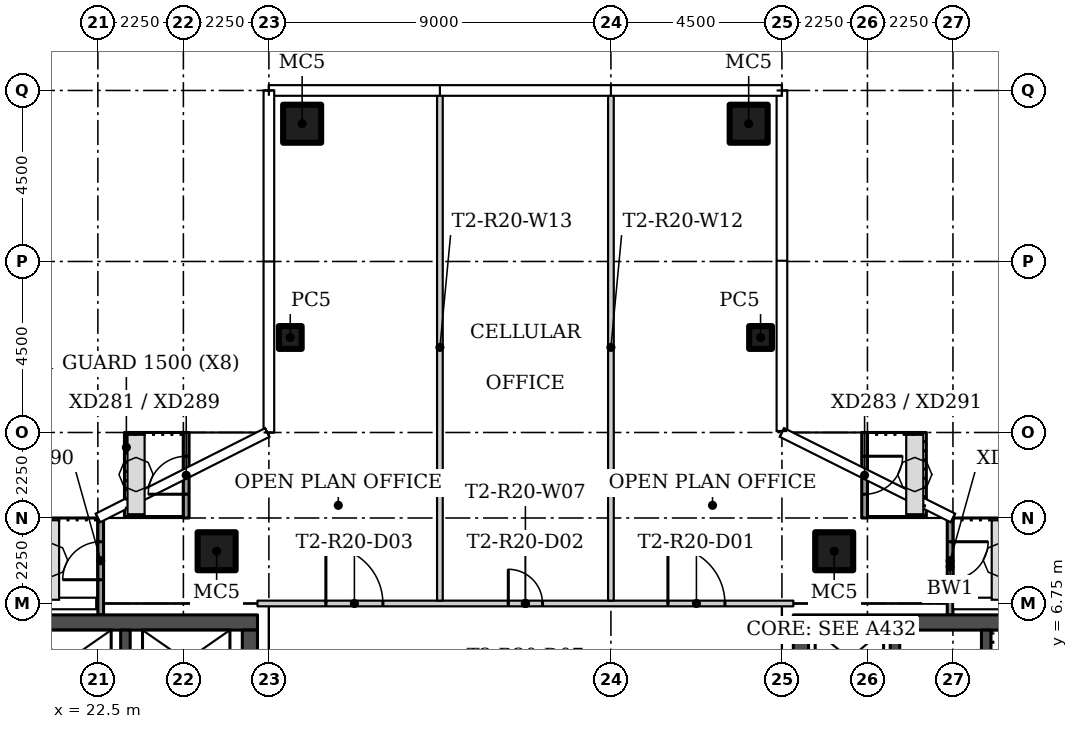
"""IFC4 building model, lengths in metres.
Left out: names, types, materials, properties, quantities, classifications, styles, units other than length and angle.
Written with IfcOpenShell. Run it as: python <this file> out.ifc"""

import sys

from ifc_helpers import new_model, si_unit, direction, frame, frame_2d, origin, origin_2d, place, context, subcontext, project, spatial, rectangle, hollow_rectangle, extrude, element, fill, save


model = new_model("IFC4")
c1 = context("Model", 3, precision=1e-05, world=origin(), true_north=direction((0.0, 1.0)))
c2 = subcontext(c1, "Body", "Model", "MODEL_VIEW")
j1 = project(units=[si_unit("LENGTHUNIT", "METRE"), si_unit("PLANEANGLEUNIT", "RADIAN")], contexts=[c1])
p1 = place(None, origin())
s1 = spatial("IfcSite", under=j1, at=p1, CompositionType="ELEMENT")
p2 = place(p1, origin())
s2 = spatial("IfcBuilding", under=s1, at=p2, CompositionType="ELEMENT")
p3 = place(p2, frame((0.0, 0.0, 186.6)))
s3 = spatial("IfcBuildingStorey", under=s2, at=p3, CompositionType="ELEMENT", Elevation=186.6)
for number, where in (
    (1, (25.625, 8.125, 0.0)),
    (2, (41.875, 8.125, 0.0)),
):
    element("IfcColumn", number, at=place(p3, frame(where)), inside=s3, PredefinedType="COLUMN", context=c2, shape_type="SweptSolid", body=[
        extrude(hollow_rectangle(XDim=1.0, YDim=1.0, WallThickness=0.04, at=origin_2d()), origin(), (0.0, 0.0, 1.0), 3.55),
    ])
p4 = place(p3, frame((39.938, 13.75, 0.0)))
e3 = element("IfcColumn", 3, at=p4, inside=s3, PredefinedType="COLUMN", context=c2, shape_type="SweptSolid", body=[
    extrude(hollow_rectangle(XDim=0.6, YDim=0.6, WallThickness=0.02, at=origin_2d()), origin(), (0.0, 0.0, 1.0), 3.55),
])
p5 = place(p3, frame((39.625, 19.375, 0.0)))
e4 = element("IfcColumn", 4, at=p5, inside=s3, PredefinedType="COLUMN", context=c2, shape_type="SweptSolid", body=[
    extrude(hollow_rectangle(XDim=1.0, YDim=1.0, WallThickness=0.04, at=origin_2d()), origin(), (0.0, 0.0, 1.0), 3.55),
])
p6 = place(p3, frame((27.562, 13.75, 0.0)))
e5 = element("IfcColumn", 5, at=p6, inside=s3, PredefinedType="COLUMN", context=c2, shape_type="SweptSolid", body=[
    extrude(hollow_rectangle(XDim=0.6, YDim=0.6, WallThickness=0.02, at=origin_2d()), origin(), (0.0, 0.0, 1.0), 3.55),
])
p7 = place(p3, frame((27.875, 19.375, 0.0)))
e6 = element("IfcColumn", 6, at=p7, inside=s3, PredefinedType="COLUMN", context=c2, shape_type="SweptSolid", body=[
    extrude(hollow_rectangle(XDim=1.0, YDim=1.0, WallThickness=0.04, at=origin_2d()), origin(), (0.0, 0.0, 1.0), 3.55),
])
p8 = place(p3, frame((26.7, 6.75, 0.0)))
e7 = element("IfcWall", 7, at=p8, inside=s3, PredefinedType="PARTITIONING", context=c2, shape_type="SweptSolid", body=[
    extrude(rectangle(XDim=14.1, YDim=0.15, at=frame_2d((7.05, 0.0))), origin(), (0.0, 0.0, 1.0), 3.55),
])
p9 = place(p8, frame((10.8, 0.0, 0.0)))
e8 = element("IfcOpeningElement", 8, at=p9, cuts=e7, PredefinedType="OPENING", context=c2, shape_type="SweptSolid", body=[
    extrude(rectangle(XDim=1.5, YDim=2.1, at=frame_2d((0.75, 1.05))), frame((0.0, 0.085, 0.0), z_axis=(0.0, -1.0, 0.0), x_axis=(1.0, 0.0, 0.0)), (0.0, 0.0, 1.0), 0.17),
])
p10 = place(p8, frame((6.6, 0.0, 0.0)))
e9 = element("IfcOpeningElement", 9, at=p10, cuts=e7, PredefinedType="OPENING", context=c2, shape_type="SweptSolid", body=[
    extrude(rectangle(XDim=0.9, YDim=2.1, at=frame_2d((0.45, 1.05))), frame((0.0, 0.085, 0.0), z_axis=(0.0, -1.0, 0.0), x_axis=(1.0, 0.0, 0.0)), (0.0, 0.0, 1.0), 0.17),
])
p11 = place(p8, frame((1.8, 0.0, 0.0)))
e10 = element("IfcOpeningElement", 10, at=p11, cuts=e7, PredefinedType="OPENING", context=c2, shape_type="SweptSolid", body=[
    extrude(rectangle(XDim=1.5, YDim=2.1, at=frame_2d((0.75, 1.05))), frame((0.0, 0.085, 0.0), z_axis=(0.0, -1.0, 0.0), x_axis=(1.0, 0.0, 0.0)), (0.0, 0.0, 1.0), 0.17),
])
for number, where, z_axis, x_axis in (
    (11, (36.0, 20.155, 0.0), (0.0, 0.0, 1.0), (0.0, -1.0, 0.0)),
    (12, (31.5, 20.155, 0.0), (0.0, 0.0, 1.0), (0.0, -1.0, 0.0)),
):
    element("IfcWall", number, at=place(p3, frame(where, z_axis=z_axis, x_axis=x_axis)), inside=s3, PredefinedType="PARTITIONING", context=c2, shape_type="SweptSolid", body=[
        extrude(rectangle(XDim=13.33, YDim=0.15, at=frame_2d((6.665, 0.0))), origin(), (0.0, 0.0, 1.0), 3.55),
    ])
p12 = place(p3, frame((24.825, 9.0, 0.0), z_axis=(0.0, 0.0, 1.0), x_axis=(0.0, 1.0, 0.0)))
e13 = element("IfcWall", 13, at=p12, inside=s3, PredefinedType="SOLIDWALL", context=c2, shape_type="SweptSolid", body=[
    extrude(rectangle(XDim=2.25, YDim=0.15, at=frame_2d((1.125, 0.0))), origin(), (0.0, 0.0, 1.0), 3.45),
])
p13 = place(p12, frame((0.625, 0.0, 0.0)))
e14 = element("IfcOpeningElement", 14, at=p13, cuts=e13, PredefinedType="OPENING", context=c2, shape_type="SweptSolid", body=[
    extrude(rectangle(XDim=1.0, YDim=2.4, at=frame_2d((0.5, 1.2))), frame((0.0, 0.085, 0.0), z_axis=(0.0, -1.0, 0.0), x_axis=(1.0, 0.0, 0.0)), (0.0, 0.0, 1.0), 0.17),
])
p14 = place(p3, frame((22.575, 6.448, 0.0), z_axis=(0.0, 0.0, 1.0), x_axis=(0.0, 1.0, 0.0)))
e15 = element("IfcWall", 15, at=p14, inside=s3, PredefinedType="SOLIDWALL", context=c2, shape_type="SweptSolid", body=[
    extrude(rectangle(XDim=2.552, YDim=0.15, at=frame_2d((1.276, 0.0))), origin(), (0.0, 0.0, 1.0), 3.45),
])
p15 = place(p14, frame((0.927, 0.0, 0.0)))
e16 = element("IfcOpeningElement", 16, at=p15, cuts=e15, PredefinedType="OPENING", context=c2, shape_type="SweptSolid", body=[
    extrude(rectangle(XDim=1.0, YDim=2.4, at=frame_2d((0.5, 1.2))), frame((0.0, 0.085, 0.0), z_axis=(0.0, -1.0, 0.0), x_axis=(1.0, 0.0, 0.0)), (0.0, 0.0, 1.0), 0.17),
])
p16 = place(p3, frame((42.675, 11.25, 0.0), z_axis=(0.0, 0.0, 1.0), x_axis=(0.0, -1.0, 0.0)))
e17 = element("IfcWall", 17, at=p16, inside=s3, PredefinedType="SOLIDWALL", context=c2, shape_type="SweptSolid", body=[
    extrude(rectangle(XDim=2.25, YDim=0.15, at=frame_2d((1.125, 0.0))), origin(), (0.0, 0.0, 1.0), 3.45),
])
p17 = place(p16, frame((0.625, 0.0, 0.0)))
e18 = element("IfcOpeningElement", 18, at=p17, cuts=e17, PredefinedType="OPENING", context=c2, shape_type="SweptSolid", body=[
    extrude(rectangle(XDim=1.0, YDim=2.4, at=frame_2d((0.5, 1.2))), frame((0.0, 0.085, 0.0), z_axis=(0.0, -1.0, 0.0), x_axis=(1.0, 0.0, 0.0)), (0.0, 0.0, 1.0), 0.17),
])
p18 = place(p3, frame((44.925, 9.0, 0.0), z_axis=(0.0, 0.0, 1.0), x_axis=(0.0, -1.0, 0.0)))
e19 = element("IfcWall", 19, at=p18, inside=s3, PredefinedType="SOLIDWALL", context=c2, shape_type="SweptSolid", body=[
    extrude(rectangle(XDim=2.557, YDim=0.15, at=frame_2d((1.278, 0.0))), origin(), (0.0, 0.0, 1.0), 3.45),
])
p19 = place(p18, frame((0.625, 0.0, 0.0)))
e20 = element("IfcOpeningElement", 20, at=p19, cuts=e19, PredefinedType="OPENING", context=c2, shape_type="SweptSolid", body=[
    extrude(rectangle(XDim=1.0, YDim=2.4, at=frame_2d((0.5, 1.2))), frame((0.0, 0.085, 0.0), z_axis=(0.0, -1.0, 0.0), x_axis=(1.0, 0.0, 0.0)), (0.0, 0.0, 1.0), 0.17),
])
p20 = place(p3, frame((13.8, 6.25, 0.0)))
e21 = element("IfcWall", 21, at=p20, inside=s3, PredefinedType="SHEAR", context=c2, shape_type="SweptSolid", body=[
    extrude(rectangle(XDim=12.9, YDim=0.4, at=frame_2d((6.45, 0.0))), origin(), (0.0, 0.0, 1.0), 3.55),
])
p21 = place(p3, frame((26.5, 6.05, 0.0), z_axis=(0.0, 0.0, 1.0), x_axis=(0.0, -1.0, 0.0)))
e22 = element("IfcWall", 22, at=p21, inside=s3, PredefinedType="SHEAR", context=c2, shape_type="SweptSolid", body=[
    extrude(rectangle(XDim=12.1, YDim=0.4, at=frame_2d((6.05, 0.0))), origin(), (0.0, 0.0, 1.0), 3.55),
])
p22 = place(p21, frame((10.1, 0.0, 0.0)))
e23 = element("IfcOpeningElement", 23, at=p22, cuts=e22, PredefinedType="OPENING", context=c2, shape_type="SweptSolid", body=[
    extrude(rectangle(XDim=1.2, YDim=2.1, at=frame_2d((0.6, 1.05))), frame((0.0, 0.21, 0.0), z_axis=(0.0, -1.0, 0.0), x_axis=(1.0, 0.0, 0.0)), (0.0, 0.0, 1.0), 0.42),
])
p23 = place(p21, frame((3.9, 0.0, 0.0)))
e24 = element("IfcOpeningElement", 24, at=p23, cuts=e22, PredefinedType="OPENING", context=c2, shape_type="SweptSolid", body=[
    extrude(rectangle(XDim=1.8, YDim=2.4, at=frame_2d((0.9, 1.2))), frame((0.0, 0.21, 0.0), z_axis=(0.0, -1.0, 0.0), x_axis=(1.0, 0.0, 0.0)), (0.0, 0.0, 1.0), 0.42),
])
p24 = place(p3, frame((23.225, 3.25, 0.0), z_axis=(0.0, 0.0, 1.0), x_axis=(0.0, 1.0, 0.0)))
e25 = element("IfcWall", 25, at=p24, inside=s3, PredefinedType="SHEAR", context=c2, shape_type="SweptSolid", body=[
    extrude(rectangle(XDim=2.8, YDim=0.25, at=frame_2d((1.4, 0.0))), origin(), (0.0, 0.0, 1.0), 3.55),
])
p25 = place(p3, frame((53.7, 6.25, 0.0), z_axis=(0.0, 0.0, 1.0), x_axis=(-1.0, 0.0, 0.0)))
e26 = element("IfcWall", 26, at=p25, inside=s3, PredefinedType="SHEAR", context=c2, shape_type="SweptSolid", body=[
    extrude(rectangle(XDim=12.9, YDim=0.4, at=frame_2d((6.45, 0.0))), origin(), (0.0, 0.0, 1.0), 3.55),
])
p26 = place(p3, frame((41.0, -6.05, 0.0), z_axis=(0.0, 0.0, 1.0), x_axis=(0.0, 1.0, 0.0)))
e27 = element("IfcWall", 27, at=p26, inside=s3, PredefinedType="SHEAR", context=c2, shape_type="SweptSolid", body=[
    extrude(rectangle(XDim=12.1, YDim=0.4, at=frame_2d((6.05, 0.0))), origin(), (0.0, 0.0, 1.0), 3.55),
])
p27 = place(p26, frame((0.8, 0.0, 0.0)))
e28 = element("IfcOpeningElement", 28, at=p27, cuts=e27, PredefinedType="OPENING", context=c2, shape_type="SweptSolid", body=[
    extrude(rectangle(XDim=1.2, YDim=2.1, at=frame_2d((0.6, 1.05))), frame((0.0, 0.21, 0.0), z_axis=(0.0, -1.0, 0.0), x_axis=(1.0, 0.0, 0.0)), (0.0, 0.0, 1.0), 0.42),
])
p28 = place(p26, frame((6.4, 0.0, 0.0)))
e29 = element("IfcOpeningElement", 29, at=p28, cuts=e27, PredefinedType="OPENING", context=c2, shape_type="SweptSolid", body=[
    extrude(rectangle(XDim=1.8, YDim=2.4, at=frame_2d((0.9, 1.2))), frame((0.0, 0.21, 0.0), z_axis=(0.0, -1.0, 0.0), x_axis=(1.0, 0.0, 0.0)), (0.0, 0.0, 1.0), 0.42),
])
for number, where, z_axis, x_axis in (
    (30, (45.875, 3.25, 0.0), (0.0, 0.0, 1.0), (0.0, 1.0, 0.0)),
    (31, (43.475, 3.25, 0.0), (0.0, 0.0, 1.0), (0.0, 1.0, 0.0)),
):
    element("IfcWall", number, at=place(p3, frame(where, z_axis=z_axis, x_axis=x_axis)), inside=s3, PredefinedType="SHEAR", context=c2, shape_type="SweptSolid", body=[
        extrude(rectangle(XDim=2.8, YDim=0.25, at=frame_2d((1.4, 0.0))), origin(), (0.0, 0.0, 1.0), 3.55),
    ])
p29 = place(p9, origin())
e32 = element("IfcDoor", 32, at=p29, inside=s3, OperationType="DOUBLE_DOOR_SINGLE_SWING", PredefinedType="DOOR", context=c2, shape_type="SweptSolid", body=[
    extrude(rectangle(XDim=1.5, YDim=2.1, at=frame_2d((0.75, 1.05))), frame((0.0, 0.025, 0.0), z_axis=(0.0, -1.0, 0.0), x_axis=(1.0, 0.0, 0.0)), (0.0, 0.0, 1.0), 0.05),
])
fill(e8, e32)
p30 = place(p10, origin())
e33 = element("IfcDoor", 33, at=p30, inside=s3, OperationType="SINGLE_SWING_LEFT", PredefinedType="DOOR", context=c2, shape_type="SweptSolid", body=[
    extrude(rectangle(XDim=0.9, YDim=2.1, at=frame_2d((0.45, 1.05))), frame((0.0, 0.025, 0.0), z_axis=(0.0, -1.0, 0.0), x_axis=(1.0, 0.0, 0.0)), (0.0, 0.0, 1.0), 0.05),
])
fill(e9, e33)
p31 = place(p11, origin())
e34 = element("IfcDoor", 34, at=p31, inside=s3, OperationType="DOUBLE_DOOR_SINGLE_SWING", PredefinedType="DOOR", context=c2, shape_type="SweptSolid", body=[
    extrude(rectangle(XDim=1.5, YDim=2.1, at=frame_2d((0.75, 1.05))), frame((0.0, 0.025, 0.0), z_axis=(0.0, -1.0, 0.0), x_axis=(1.0, 0.0, 0.0)), (0.0, 0.0, 1.0), 0.05),
])
fill(e10, e34)
p32 = place(p13, origin())
e35 = element("IfcDoor", 35, at=p32, inside=s3, OperationType="SINGLE_SWING_RIGHT", PredefinedType="DOOR", context=c2, shape_type="SweptSolid", body=[
    extrude(rectangle(XDim=1.0, YDim=2.4, at=frame_2d((0.5, 1.2))), frame((0.0, 0.025, 0.0), z_axis=(0.0, -1.0, 0.0), x_axis=(1.0, 0.0, 0.0)), (0.0, 0.0, 1.0), 0.05),
])
fill(e14, e35)
p33 = place(p15, origin())
e36 = element("IfcDoor", 36, at=p33, inside=s3, OperationType="SINGLE_SWING_LEFT", PredefinedType="DOOR", context=c2, shape_type="SweptSolid", body=[
    extrude(rectangle(XDim=1.0, YDim=2.4, at=frame_2d((0.5, 1.2))), frame((0.0, 0.025, 0.0), z_axis=(0.0, -1.0, 0.0), x_axis=(1.0, 0.0, 0.0)), (0.0, 0.0, 1.0), 0.05),
])
fill(e16, e36)
p34 = place(p17, origin())
e37 = element("IfcDoor", 37, at=p34, inside=s3, OperationType="SINGLE_SWING_RIGHT", PredefinedType="DOOR", context=c2, shape_type="SweptSolid", body=[
    extrude(rectangle(XDim=1.0, YDim=2.4, at=frame_2d((0.5, 1.2))), frame((0.0, 0.025, 0.0), z_axis=(0.0, -1.0, 0.0), x_axis=(1.0, 0.0, 0.0)), (0.0, 0.0, 1.0), 0.05),
])
fill(e18, e37)
p35 = place(p19, origin())
e38 = element("IfcDoor", 38, at=p35, inside=s3, OperationType="SINGLE_SWING_LEFT", PredefinedType="DOOR", context=c2, shape_type="SweptSolid", body=[
    extrude(rectangle(XDim=1.0, YDim=2.4, at=frame_2d((0.5, 1.2))), frame((0.0, 0.025, 0.0), z_axis=(0.0, -1.0, 0.0), x_axis=(1.0, 0.0, 0.0)), (0.0, 0.0, 1.0), 0.05),
])
fill(e20, e38)
save(model, sys.argv[1])
